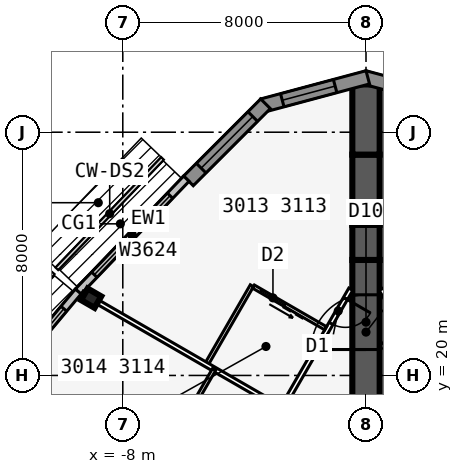
"""IFC4 building model, lengths in metres.
Left out: names, types, materials, properties, quantities, classifications, styles, units other than length and angle.
Written with IfcOpenShell. Run it as: python <this file> out.ifc"""

import sys

from ifc_helpers import new_model, si_unit, direction, frame, frame_2d, origin, origin_2d, place, context, subcontext, project, spatial, polyline, rectangle, i_section, outline, extrude, element, fill, save


model = new_model("IFC4")
c1 = context("Model", 3, precision=1e-05, world=origin(), true_north=direction((0.0, 1.0)))
c2 = subcontext(c1, "Body", "Model", "MODEL_VIEW")
j1 = project(units=[si_unit("LENGTHUNIT", "METRE"), si_unit("PLANEANGLEUNIT", "RADIAN")], contexts=[c1])
p1 = place(None, origin())
s1 = spatial("IfcSite", under=j1, at=p1, CompositionType="ELEMENT")
p2 = place(p1, origin())
s2 = spatial("IfcBuilding", under=s1, at=p2, CompositionType="ELEMENT")
p3 = place(p2, frame((0.0, 0.0, 118.1)))
s3 = spatial("IfcBuildingStorey", under=s2, at=p3, CompositionType="ELEMENT", Elevation=118.1)
p4 = place(p3, frame((0.0, 19.052, 0.0), z_axis=(0.0, 0.0, 1.0), x_axis=(0.0, 1.0, 0.0)))
e1 = element("IfcWall", 1, at=p4, inside=s3, PredefinedType="SHEAR", context=c2, shape_type="SweptSolid", body=[
    extrude(rectangle(XDim=4.746, YDim=0.9, at=frame_2d((2.373, 0.0))), origin(), (0.0, 0.0, 1.0), 3.4),
])
p5 = place(p4, frame((1.8, 0.0, 0.0)))
e2 = element("IfcOpeningElement", 2, at=p5, cuts=e1, PredefinedType="OPENING", context=c2, shape_type="SweptSolid", body=[
    extrude(rectangle(XDim=1.8, YDim=2.13, at=frame_2d((0.9, 1.065))), frame((0.0, 0.46, 0.0), z_axis=(0.0, -1.0, 0.0), x_axis=(1.0, 0.0, 0.0)), (0.0, 0.0, 1.0), 0.92),
])
p6 = place(p3, frame((0.0, 23.799, 0.0), z_axis=(0.0, 0.0, 1.0), x_axis=(0.0, 1.0, 0.0)))
e3 = element("IfcWall", 3, at=p6, inside=s3, PredefinedType="SHEAR", context=c2, shape_type="SweptSolid", body=[
    extrude(rectangle(XDim=1.155, YDim=0.9, at=frame_2d((0.577, 0.0))), origin(), (0.0, 0.0, 1.0), 3.4),
])
p7 = place(p3, frame((0.0, 24.953, 0.0), z_axis=(0.0, 0.0, 1.0), x_axis=(0.0, 1.0, 0.0)))
e4 = element("IfcWall", 4, at=p7, inside=s3, PredefinedType="SHEAR", context=c2, shape_type="SweptSolid", body=[
    extrude(rectangle(XDim=2.309, YDim=0.9, at=frame_2d((1.155, 0.0))), origin(), (0.0, 0.0, 1.0), 3.4),
])
p8 = place(p3, frame((0.0, 27.263, 0.0), z_axis=(0.0, 0.0, 1.0), x_axis=(0.0, 1.0, 0.0)))
e5 = element("IfcWall", 5, at=p8, inside=s3, PredefinedType="SHEAR", context=c2, shape_type="SweptSolid", body=[
    extrude(rectangle(XDim=2.31, YDim=0.9, at=frame_2d((1.155, 0.0))), origin(), (0.0, 0.0, 1.0), 3.4),
])
p9 = place(p3, frame((-9.041, 22.541, 0.0), z_axis=(0.0, 0.0, 1.0), x_axis=(-0.5, -0.866025403784, 0.0)))
e6 = element("IfcColumn", 6, at=p9, inside=s3, PredefinedType="COLUMN", context=c2, shape_type="SweptSolid", body=[
    extrude(i_section(OverallWidth=0.437, OverallDepth=0.513, WebThickness=0.061, FlangeThickness=0.097, at=origin_2d()), origin(), (0.0, 0.0, 1.0), 3.4),
])
p10 = place(p3, frame((3.406, 28.877, 0.0), z_axis=(0.0, 0.0, 1.0), x_axis=(-0.965924653531, 0.258823421857, 0.0)))
e7 = element("IfcWall", 7, at=p10, inside=s3, PredefinedType="SOLIDWALL", context=c2, shape_type="SweptSolid", body=[
    extrude(outline(polyline([(3.586, 0.225), (3.527, 0.225), (3.035, 0.093), (3.0, 0.225), (0.0, 0.225), (0.0, -0.225), (3.586, -0.225), (3.586, 0.225)])), origin(), (0.0, 0.0, 1.0), 3.235),
])
p11 = place(p10, frame((0.675, 0.0, 0.45)))
e8 = element("IfcOpeningElement", 8, at=p11, cuts=e7, PredefinedType="OPENING", context=c2, shape_type="SweptSolid", body=[
    extrude(rectangle(XDim=1.8, YDim=2.4, at=frame_2d((0.9, 1.2))), frame((0.0, 0.235, 0.0), z_axis=(0.0, -1.0, 0.0), x_axis=(1.0, 0.0, 0.0)), (0.0, 0.0, 1.0), 0.47),
])
p12 = place(p3, frame((0.058, 29.805, 0.0), z_axis=(0.0, 0.0, 1.0), x_axis=(-0.965924653531, -0.258823421857, 0.0)))
e9 = element("IfcWall", 9, at=p12, inside=s3, PredefinedType="SOLIDWALL", context=c2, shape_type="SweptSolid", body=[
    extrude(outline(polyline([(3.586, 0.225), (0.586, 0.225), (0.551, 0.093), (0.06, 0.225), (0.0, 0.225), (0.0, -0.225), (3.586, -0.225), (3.586, 0.225)])), origin(), (0.0, 0.0, 1.0), 3.235),
])
p13 = place(p12, frame((1.111, 0.0, 0.45)))
e10 = element("IfcOpeningElement", 10, at=p13, cuts=e9, PredefinedType="OPENING", context=c2, shape_type="SweptSolid", body=[
    extrude(rectangle(XDim=1.8, YDim=2.4, at=frame_2d((0.9, 1.2))), frame((0.0, 0.235, 0.0), z_axis=(0.0, -1.0, 0.0), x_axis=(1.0, 0.0, 0.0)), (0.0, 0.0, 1.0), 0.47),
])
p14 = place(p3, frame((-3.305, 28.935, 0.0), z_axis=(0.0, 0.0, 1.0), x_axis=(-0.707106781187, -0.707106781187, 0.0)))
e11 = element("IfcWall", 11, at=p14, inside=s3, PredefinedType="SOLIDWALL", context=c2, shape_type="SweptSolid", body=[
    extrude(rectangle(XDim=3.586, YDim=0.45, at=frame_2d((1.793, 0.0))), origin(), (0.0, 0.0, 1.0), 3.235),
])
p15 = place(p14, frame((0.593, 0.0, 0.45)))
e12 = element("IfcOpeningElement", 12, at=p15, cuts=e11, PredefinedType="OPENING", context=c2, shape_type="SweptSolid", body=[
    extrude(rectangle(XDim=2.4, YDim=2.4, at=frame_2d((1.2, 1.2))), frame((0.0, 0.235, 0.0), z_axis=(0.0, -1.0, 0.0), x_axis=(1.0, 0.0, 0.0)), (0.0, 0.0, 1.0), 0.47),
])
p16 = place(p3, frame((-5.91, 26.472, 0.0), z_axis=(0.0, 0.0, 1.0), x_axis=(-0.691719937936, -0.722165858693, 0.0)))
e13 = element("IfcWall", 13, at=p16, inside=s3, PredefinedType="STANDARD", context=c2, shape_type="SweptSolid", body=[
    extrude(rectangle(XDim=5.148, YDim=0.25, at=frame_2d((2.574, 0.0))), origin(), (0.0, 0.0, 1.0), 3.235),
])
p17 = place(p16, frame((0.774, 0.0, 0.45)))
e14 = element("IfcOpeningElement", 14, at=p17, cuts=e13, PredefinedType="OPENING", context=c2, shape_type="SweptSolid", body=[
    extrude(rectangle(XDim=3.6, YDim=2.4, at=frame_2d((1.8, 1.2))), frame((0.0, 0.135, 0.0), z_axis=(0.0, -1.0, 0.0), x_axis=(1.0, 0.0, 0.0)), (0.0, 0.0, 1.0), 0.27),
])
p18 = place(p3, frame((-9.465, 22.76, 0.0), z_axis=(0.0, 0.0, 1.0), x_axis=(-0.641810386606, -0.766863369607, 0.0)))
e15 = element("IfcWall", 15, at=p18, inside=s3, PredefinedType="STANDARD", context=c2, shape_type="SweptSolid", body=[
    extrude(rectangle(XDim=5.076, YDim=0.25, at=frame_2d((2.538, 0.0))), origin(), (0.0, 0.0, 1.0), 3.235),
])
p19 = place(p18, frame((0.738, 0.0, 0.45)))
e16 = element("IfcOpeningElement", 16, at=p19, cuts=e15, PredefinedType="OPENING", context=c2, shape_type="SweptSolid", body=[
    extrude(rectangle(XDim=3.6, YDim=2.4, at=frame_2d((1.8, 1.2))), frame((0.0, 0.135, 0.0), z_axis=(0.0, -1.0, 0.0), x_axis=(1.0, 0.0, 0.0)), (0.0, 0.0, 1.0), 0.27),
])
p20 = place(p3, frame((20.027, -10.985, 0.0), z_axis=(0.0, 0.0, 1.0), x_axis=(-0.500001677587, 0.866024435227, 0.0)))
e17 = element("IfcWall", 17, at=p20, inside=s3, PredefinedType="PARTITIONING", context=c2, shape_type="SweptSolid", body=[
    extrude(rectangle(XDim=39.054, YDim=0.15, at=frame_2d((19.527, 0.0))), origin(), (0.0, 0.0, 1.0), 3.235),
])
p21 = place(p20, frame((0.352, 0.0, 0.0)))
e18 = element("IfcOpeningElement", 18, at=p21, cuts=e17, PredefinedType="OPENING", context=c2, shape_type="SweptSolid", body=[
    extrude(rectangle(XDim=0.95, YDim=2.13, at=frame_2d((0.475, 1.065))), frame((0.0, 0.085, 0.0), z_axis=(0.0, -1.0, 0.0), x_axis=(1.0, 0.0, 0.0)), (0.0, 0.0, 1.0), 0.17),
])
p22 = place(p20, frame((7.752, 0.0, 0.0)))
e19 = element("IfcOpeningElement", 19, at=p22, cuts=e17, PredefinedType="OPENING", context=c2, shape_type="SweptSolid", body=[
    extrude(rectangle(XDim=0.95, YDim=2.13, at=frame_2d((0.475, 1.065))), frame((0.0, 0.085, 0.0), z_axis=(0.0, -1.0, 0.0), x_axis=(1.0, 0.0, 0.0)), (0.0, 0.0, 1.0), 0.17),
])
p23 = place(p20, frame((17.752, 0.0, 0.0)))
e20 = element("IfcOpeningElement", 20, at=p23, cuts=e17, PredefinedType="OPENING", context=c2, shape_type="SweptSolid", body=[
    extrude(rectangle(XDim=0.95, YDim=2.13, at=frame_2d((0.475, 1.065))), frame((0.0, 0.085, 0.0), z_axis=(0.0, -1.0, 0.0), x_axis=(1.0, 0.0, 0.0)), (0.0, 0.0, 1.0), 0.17),
])
p24 = place(p20, frame((22.152, 0.0, 0.0)))
e21 = element("IfcOpeningElement", 21, at=p24, cuts=e17, PredefinedType="OPENING", context=c2, shape_type="SweptSolid", body=[
    extrude(rectangle(XDim=0.95, YDim=2.13, at=frame_2d((0.475, 1.065))), frame((0.0, 0.085, 0.0), z_axis=(0.0, -1.0, 0.0), x_axis=(1.0, 0.0, 0.0)), (0.0, 0.0, 1.0), 0.17),
])
p25 = place(p20, frame((27.152, 0.0, 0.0)))
e22 = element("IfcOpeningElement", 22, at=p25, cuts=e17, PredefinedType="OPENING", context=c2, shape_type="SweptSolid", body=[
    extrude(rectangle(XDim=0.95, YDim=2.13, at=frame_2d((0.475, 1.065))), frame((0.0, 0.085, 0.0), z_axis=(0.0, -1.0, 0.0), x_axis=(1.0, 0.0, 0.0)), (0.0, 0.0, 1.0), 0.17),
])
p26 = place(p20, frame((36.546, 0.0, 0.0)))
e23 = element("IfcOpeningElement", 23, at=p26, cuts=e17, PredefinedType="OPENING", context=c2, shape_type="SweptSolid", body=[
    extrude(rectangle(XDim=0.95, YDim=2.13, at=frame_2d((0.475, 1.065))), frame((0.0, 0.085, 0.0), z_axis=(0.0, -1.0, 0.0), x_axis=(1.0, 0.0, 0.0)), (0.0, 0.0, 1.0), 0.17),
])
p27 = place(p3, frame((-0.5, 22.836, 0.0), z_axis=(0.0, 0.0, 1.0), x_axis=(-0.500001677587, -0.866024435227, 0.0)))
e24 = element("IfcWall", 24, at=p27, inside=s3, PredefinedType="PARTITIONING", context=c2, shape_type="SweptSolid", body=[
    extrude(rectangle(XDim=39.054, YDim=0.15, at=frame_2d((19.527, 0.0))), origin(), (0.0, 0.0, 1.0), 3.235),
])
p28 = place(p27, frame((0.352, 0.0, 0.0)))
e25 = element("IfcOpeningElement", 25, at=p28, cuts=e24, PredefinedType="OPENING", context=c2, shape_type="SweptSolid", body=[
    extrude(rectangle(XDim=0.95, YDim=2.13, at=frame_2d((0.475, 1.065))), frame((0.0, 0.085, 0.0), z_axis=(0.0, -1.0, 0.0), x_axis=(1.0, 0.0, 0.0)), (0.0, 0.0, 1.0), 0.17),
])
p29 = place(p27, frame((7.152, 0.0, 0.0)))
e26 = element("IfcOpeningElement", 26, at=p29, cuts=e24, PredefinedType="OPENING", context=c2, shape_type="SweptSolid", body=[
    extrude(rectangle(XDim=0.95, YDim=2.13, at=frame_2d((0.475, 1.065))), frame((0.0, 0.085, 0.0), z_axis=(0.0, -1.0, 0.0), x_axis=(1.0, 0.0, 0.0)), (0.0, 0.0, 1.0), 0.17),
])
p30 = place(p27, frame((12.152, 0.0, 0.0)))
e27 = element("IfcOpeningElement", 27, at=p30, cuts=e24, PredefinedType="OPENING", context=c2, shape_type="SweptSolid", body=[
    extrude(rectangle(XDim=0.95, YDim=2.13, at=frame_2d((0.475, 1.065))), frame((0.0, 0.085, 0.0), z_axis=(0.0, -1.0, 0.0), x_axis=(1.0, 0.0, 0.0)), (0.0, 0.0, 1.0), 0.17),
])
p31 = place(p27, frame((17.152, 0.0, 0.0)))
e28 = element("IfcOpeningElement", 28, at=p31, cuts=e24, PredefinedType="OPENING", context=c2, shape_type="SweptSolid", body=[
    extrude(rectangle(XDim=0.95, YDim=2.13, at=frame_2d((0.475, 1.065))), frame((0.0, 0.085, 0.0), z_axis=(0.0, -1.0, 0.0), x_axis=(1.0, 0.0, 0.0)), (0.0, 0.0, 1.0), 0.17),
])
p32 = place(p27, frame((22.752, 0.0, 0.0)))
e29 = element("IfcOpeningElement", 29, at=p32, cuts=e24, PredefinedType="OPENING", context=c2, shape_type="SweptSolid", body=[
    extrude(rectangle(XDim=0.95, YDim=2.13, at=frame_2d((0.475, 1.065))), frame((0.0, 0.085, 0.0), z_axis=(0.0, -1.0, 0.0), x_axis=(1.0, 0.0, 0.0)), (0.0, 0.0, 1.0), 0.17),
])
p33 = place(p27, frame((32.152, 0.0, 0.0)))
e30 = element("IfcOpeningElement", 30, at=p33, cuts=e24, PredefinedType="OPENING", context=c2, shape_type="SweptSolid", body=[
    extrude(rectangle(XDim=0.95, YDim=2.13, at=frame_2d((0.475, 1.065))), frame((0.0, 0.085, 0.0), z_axis=(0.0, -1.0, 0.0), x_axis=(1.0, 0.0, 0.0)), (0.0, 0.0, 1.0), 0.17),
])
p34 = place(p27, frame((37.752, 0.0, 0.0)))
e31 = element("IfcOpeningElement", 31, at=p34, cuts=e24, PredefinedType="OPENING", context=c2, shape_type="SweptSolid", body=[
    extrude(rectangle(XDim=0.95, YDim=2.13, at=frame_2d((0.475, 1.065))), frame((0.0, 0.085, 0.0), z_axis=(0.0, -1.0, 0.0), x_axis=(1.0, 0.0, 0.0)), (0.0, 0.0, 1.0), 0.17),
])
p35 = place(p3, frame((-2.829, 18.954, 0.0), z_axis=(0.0, 0.0, 1.0), x_axis=(-0.866015739374, 0.500016738876, 0.0)))
e32 = element("IfcWall", 32, at=p35, inside=s3, PredefinedType="PARTITIONING", context=c2, shape_type="SweptSolid", body=[
    extrude(rectangle(XDim=7.516, YDim=0.15, at=frame_2d((3.758, 0.0))), origin(), (0.0, 0.0, 1.0), 2.389),
])
p36 = place(p3, frame((-3.753, 22.952, 0.0), z_axis=(0.0, 0.0, 1.0), x_axis=(-0.499990139034, -0.866031096941, 0.0)))
e33 = element("IfcWall", 33, at=p36, inside=s3, PredefinedType="PLUMBINGWALL", context=c2, shape_type="SweptSolid", body=[
    extrude(rectangle(XDim=3.0, YDim=0.12, at=frame_2d((1.5, 0.0))), origin(), (0.0, 0.0, 1.0), 3.235),
])
p37 = place(p3, frame((-1.329, 21.552, 0.0), z_axis=(0.0, 0.0, 1.0), x_axis=(-0.865997131366, 0.500048966069, 0.0)))
e34 = element("IfcWall", 34, at=p37, inside=s3, PredefinedType="PLUMBINGWALL", context=c2, shape_type="SweptSolid", body=[
    extrude(rectangle(XDim=2.74, YDim=0.12, at=frame_2d((1.37, 0.0))), origin(), (0.0, 0.0, 1.0), 3.235),
])
p38 = place(p37, frame((1.55, 0.0, 0.0)))
e35 = element("IfcOpeningElement", 35, at=p38, cuts=e34, PredefinedType="OPENING", context=c2, shape_type="SweptSolid", body=[
    extrude(rectangle(XDim=0.9, YDim=2.13, at=frame_2d((0.45, 1.065))), frame((0.0, 0.07, 0.0), z_axis=(0.0, -1.0, 0.0), x_axis=(1.0, 0.0, 0.0)), (0.0, 0.0, 1.0), 0.14),
])
p39 = place(p3, frame((-4.993, 20.204, 0.0), z_axis=(0.0, 0.0, 1.0), x_axis=(-0.500033551112, -0.866006032174, 0.0)))
e36 = element("IfcWall", 36, at=p39, inside=s3, PredefinedType="PLUMBINGWALL", context=c2, shape_type="SweptSolid", body=[
    extrude(rectangle(XDim=2.4, YDim=0.12, at=frame_2d((1.2, 0.0))), origin(), (0.0, 0.0, 1.0), 3.235),
])
p40 = place(p13, origin())
e37 = element("IfcWindow", 37, at=p40, inside=s3, PartitioningType="SINGLE_PANEL", PredefinedType="WINDOW", context=c2, shape_type="SweptSolid", body=[
    extrude(rectangle(XDim=1.8, YDim=2.4, at=frame_2d((0.9, 1.2))), frame((0.0, 0.03, 0.0), z_axis=(0.0, -1.0, 0.0), x_axis=(1.0, 0.0, 0.0)), (0.0, 0.0, 1.0), 0.06),
])
fill(e10, e37)
p41 = place(p15, origin())
e38 = element("IfcWindow", 38, at=p41, inside=s3, PartitioningType="SINGLE_PANEL", PredefinedType="WINDOW", context=c2, shape_type="SweptSolid", body=[
    extrude(rectangle(XDim=2.4, YDim=2.4, at=frame_2d((1.2, 1.2))), frame((0.0, 0.03, 0.0), z_axis=(0.0, -1.0, 0.0), x_axis=(1.0, 0.0, 0.0)), (0.0, 0.0, 1.0), 0.06),
])
fill(e12, e38)
p42 = place(p17, origin())
e39 = element("IfcWindow", 39, at=p42, inside=s3, PartitioningType="SINGLE_PANEL", PredefinedType="WINDOW", context=c2, shape_type="SweptSolid", body=[
    extrude(rectangle(XDim=3.6, YDim=2.4, at=frame_2d((1.8, 1.2))), frame((0.0, 0.03, 0.0), z_axis=(0.0, -1.0, 0.0), x_axis=(1.0, 0.0, 0.0)), (0.0, 0.0, 1.0), 0.06),
])
fill(e14, e39)
p43 = place(p19, origin())
e40 = element("IfcWindow", 40, at=p43, inside=s3, PartitioningType="SINGLE_PANEL", PredefinedType="WINDOW", context=c2, shape_type="SweptSolid", body=[
    extrude(rectangle(XDim=3.6, YDim=2.4, at=frame_2d((1.8, 1.2))), frame((0.0, 0.03, 0.0), z_axis=(0.0, -1.0, 0.0), x_axis=(1.0, 0.0, 0.0)), (0.0, 0.0, 1.0), 0.06),
])
fill(e16, e40)
p44 = place(p38, origin())
e41 = element("IfcDoor", 41, at=p44, inside=s3, OperationType="SLIDING_TO_LEFT", PredefinedType="DOOR", context=c2, shape_type="SweptSolid", body=[
    extrude(rectangle(XDim=0.9, YDim=2.13, at=frame_2d((0.45, 1.065))), frame((0.0, 0.025, 0.0), z_axis=(0.0, -1.0, 0.0), x_axis=(1.0, 0.0, 0.0)), (0.0, 0.0, 1.0), 0.05),
])
fill(e35, e41)
p45 = place(p28, origin())
e42 = element("IfcDoor", 42, at=p45, inside=s3, OperationType="SINGLE_SWING_LEFT", PredefinedType="DOOR", context=c2, shape_type="SweptSolid", body=[
    extrude(rectangle(XDim=0.95, YDim=2.13, at=frame_2d((0.475, 1.065))), frame((0.0, 0.025, 0.0), z_axis=(0.0, -1.0, 0.0), x_axis=(1.0, 0.0, 0.0)), (0.0, 0.0, 1.0), 0.05),
])
fill(e25, e42)
p46 = place(p5, origin())
e43 = element("IfcDoor", 43, at=p46, inside=s3, OperationType="DOUBLE_DOOR_DOUBLE_SWING", PredefinedType="DOOR", context=c2, shape_type="SweptSolid", body=[
    extrude(rectangle(XDim=1.8, YDim=2.13, at=frame_2d((0.9, 1.065))), frame((0.0, 0.025, 0.0), z_axis=(0.0, -1.0, 0.0), x_axis=(1.0, 0.0, 0.0)), (0.0, 0.0, 1.0), 0.05),
])
fill(e2, e43)
save(model, sys.argv[1])
